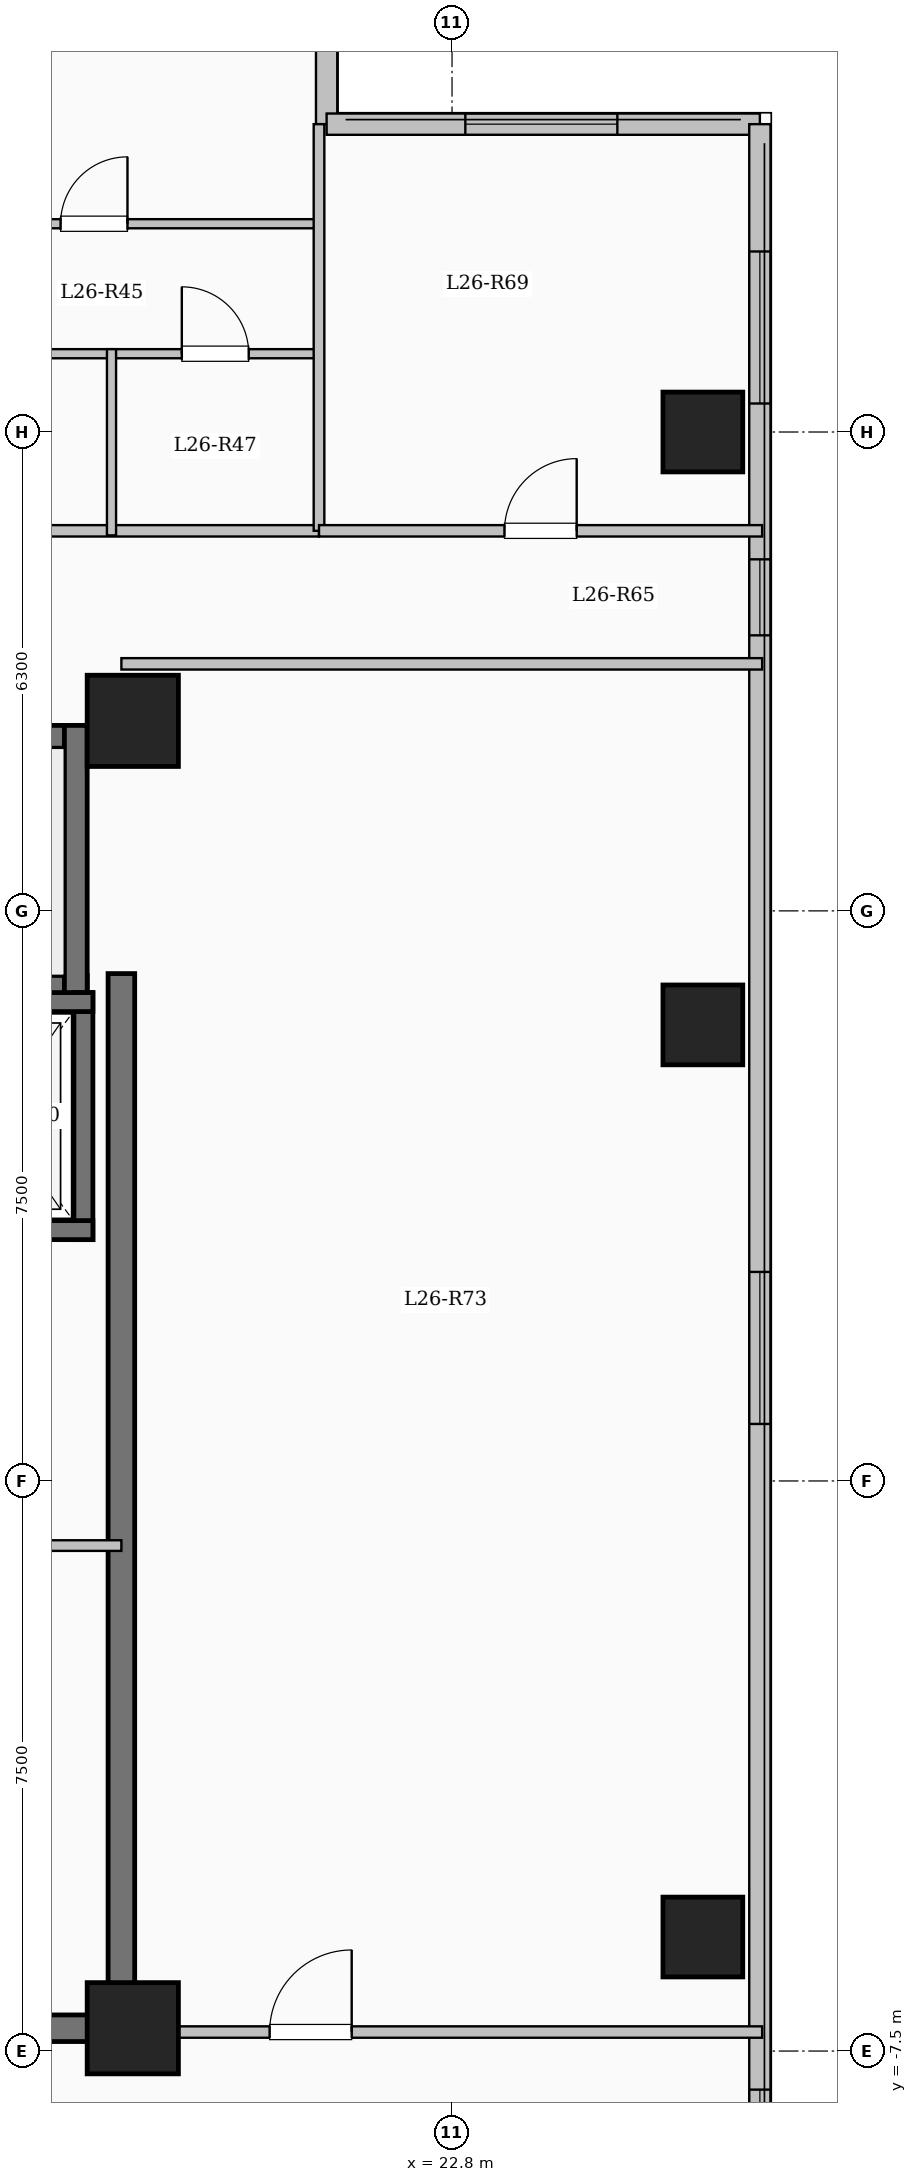
"""IFC4 building model, lengths in metres.
Left out: names, types, materials, properties, quantities, classifications, styles, units other than length and angle.
Written with IfcOpenShell. Run it as: python <this file> out.ifc"""

import sys

from ifc_helpers import new_model, si_unit, direction, frame, frame_2d, origin, origin_2d, place, context, subcontext, project, spatial, rectangle, extrude, element, fill, save


model = new_model("IFC4")
c1 = context("Model", 3, precision=1e-05, world=origin(), true_north=direction((0.0, 1.0)))
c2 = subcontext(c1, "Body", "Model", "MODEL_VIEW")
j1 = project(units=[si_unit("LENGTHUNIT", "METRE"), si_unit("PLANEANGLEUNIT", "RADIAN")], contexts=[c1])
p1 = place(None, origin())
s1 = spatial("IfcSite", under=j1, at=p1, CompositionType="ELEMENT")
p2 = place(p1, origin())
s2 = spatial("IfcBuilding", under=s1, at=p2, CompositionType="ELEMENT")
p3 = place(p2, frame((0.0, 0.0, 98.4)))
s3 = spatial("IfcBuildingStorey", under=s2, at=p3, CompositionType="ELEMENT", Elevation=98.4)
for number, where, z_axis, x_axis in (
    (1, (18.6, -7.2, 0.0), (0.0, 0.0, 1.0), (1.0, 0.0, 0.0)),
    (2, (18.6, 10.0, 0.0), (0.0, 0.0, 1.0), (1.0, 0.0, 0.0)),
):
    element("IfcColumn", number, at=place(p3, frame(where, z_axis=z_axis, x_axis=x_axis)), inside=s3, PredefinedType="COLUMN", context=c2, shape_type="SweptSolid", body=[
        extrude(rectangle(XDim=1.2, YDim=1.2, at=origin_2d()), origin(), (0.0, 0.0, 1.0), 3.35),
    ])
for number, where, z_axis, x_axis in (
    (3, (26.1, -6.0, 0.0), (0.0, 0.0, 1.0), (1.0, 0.0, 0.0)),
    (4, (26.1, 6.0, 0.0), (0.0, 0.0, 1.0), (1.0, 0.0, 0.0)),
    (5, (26.1, 13.8, 0.0), (0.0, 0.0, 1.0), (1.0, 0.0, 0.0)),
):
    element("IfcColumn", number, at=place(p3, frame(where, z_axis=z_axis, x_axis=x_axis)), inside=s3, PredefinedType="COLUMN", context=c2, shape_type="SweptSolid", body=[
        extrude(rectangle(XDim=1.05, YDim=1.05, at=origin_2d()), origin(), (0.0, 0.0, 1.0), 3.35),
    ])
p4 = place(p3, frame((21.15, 22.05, 0.0), z_axis=(0.0, 0.0, 1.0), x_axis=(0.0, -1.0, 0.0)))
e6 = element("IfcWall", 6, at=p4, inside=s3, PredefinedType="SOLIDWALL", context=c2, shape_type="SweptSolid", body=[
    extrude(rectangle(XDim=4.2, YDim=0.28, at=frame_2d((2.1, 0.0))), origin(), (0.0, 0.0, 1.0), 3.1),
])
p5 = place(p4, frame((1.218, 0.0, 0.9)))
e7 = element("IfcOpeningElement", 7, at=p5, cuts=e6, PredefinedType="OPENING", context=c2, shape_type="SweptSolid", body=[
    extrude(rectangle(XDim=1.8, YDim=1.65, at=frame_2d((0.9, 0.825))), frame((0.0, 0.15, 0.0), z_axis=(0.0, -1.0, 0.0), x_axis=(1.0, 0.0, 0.0)), (0.0, 0.0, 1.0), 0.3),
])
p6 = place(p3, frame((21.15, 17.85, 0.0), z_axis=(0.0, 0.0, 1.0), x_axis=(1.0, 0.0, 0.0)))
e8 = element("IfcWall", 8, at=p6, inside=s3, PredefinedType="SOLIDWALL", context=c2, shape_type="SweptSolid", body=[
    extrude(rectangle(XDim=5.7, YDim=0.28, at=frame_2d((2.85, 0.0))), origin(), (0.0, 0.0, 1.0), 3.1),
])
p7 = place(p6, frame((1.825, 0.0, 0.9)))
e9 = element("IfcOpeningElement", 9, at=p7, cuts=e8, PredefinedType="OPENING", context=c2, shape_type="SweptSolid", body=[
    extrude(rectangle(XDim=2.0, YDim=1.7, at=frame_2d((1.0, 0.85))), frame((0.0, 0.15, 0.0), z_axis=(0.0, -1.0, 0.0), x_axis=(1.0, 0.0, 0.0)), (0.0, 0.0, 1.0), 0.3),
])
p8 = place(p3, frame((26.85, 17.85, 0.0), z_axis=(0.0, 0.0, 1.0), x_axis=(0.0, -1.0, 0.0)))
e10 = element("IfcWall", 10, at=p8, inside=s3, PredefinedType="SOLIDWALL", context=c2, shape_type="SweptSolid", body=[
    extrude(rectangle(XDim=35.7, YDim=0.28, at=frame_2d((17.85, 0.0))), origin(), (0.0, 0.0, 1.0), 3.1),
])
p9 = place(p8, frame((1.675, 0.0, 0.9)))
e11 = element("IfcOpeningElement", 11, at=p9, cuts=e10, PredefinedType="OPENING", context=c2, shape_type="SweptSolid", body=[
    extrude(rectangle(XDim=2.0, YDim=1.7, at=frame_2d((1.0, 0.85))), frame((0.0, 0.15, 0.0), z_axis=(0.0, -1.0, 0.0), x_axis=(1.0, 0.0, 0.0)), (0.0, 0.0, 1.0), 0.3),
])
p10 = place(p8, frame((5.725, 0.0, 0.95)))
e12 = element("IfcOpeningElement", 12, at=p10, cuts=e10, PredefinedType="OPENING", context=c2, shape_type="SweptSolid", body=[
    extrude(rectangle(XDim=1.0, YDim=1.5, at=frame_2d((0.5, 0.75))), frame((0.0, 0.15, 0.0), z_axis=(0.0, -1.0, 0.0), x_axis=(1.0, 0.0, 0.0)), (0.0, 0.0, 1.0), 0.3),
])
p11 = place(p8, frame((15.1, 0.0, 0.9)))
e13 = element("IfcOpeningElement", 13, at=p11, cuts=e10, PredefinedType="OPENING", context=c2, shape_type="SweptSolid", body=[
    extrude(rectangle(XDim=2.0, YDim=1.7, at=frame_2d((1.0, 0.85))), frame((0.0, 0.15, 0.0), z_axis=(0.0, -1.0, 0.0), x_axis=(1.0, 0.0, 0.0)), (0.0, 0.0, 1.0), 0.3),
])
p12 = place(p8, frame((25.857, 0.0, 0.9)))
e14 = element("IfcOpeningElement", 14, at=p12, cuts=e10, PredefinedType="OPENING", context=c2, shape_type="SweptSolid", body=[
    extrude(rectangle(XDim=1.5, YDim=1.65, at=frame_2d((0.75, 0.825))), frame((0.0, 0.15, 0.0), z_axis=(0.0, -1.0, 0.0), x_axis=(1.0, 0.0, 0.0)), (0.0, 0.0, 1.0), 0.3),
])
p13 = place(p8, frame((30.75, 0.0, 0.9)))
e15 = element("IfcOpeningElement", 15, at=p13, cuts=e10, PredefinedType="OPENING", context=c2, shape_type="SweptSolid", body=[
    extrude(rectangle(XDim=2.4, YDim=1.8, at=frame_2d((1.2, 0.9))), frame((0.0, 0.15, 0.0), z_axis=(0.0, -1.0, 0.0), x_axis=(1.0, 0.0, 0.0)), (0.0, 0.0, 1.0), 0.3),
])
p14 = place(p3, frame((10.0, 9.79, 0.0), z_axis=(0.0, 0.0, 1.0), x_axis=(1.0, 0.0, 0.0)))
e16 = element("IfcWall", 16, at=p14, inside=s3, PredefinedType="SHEAR", context=c2, shape_type="SweptSolid", body=[
    extrude(rectangle(XDim=8.0, YDim=0.3, at=frame_2d((4.0, 0.0))), origin(), (0.0, 0.0, 1.0), 3.35),
])
p15 = place(p3, frame((10.0, 6.5, 0.0), z_axis=(0.0, 0.0, 1.0), x_axis=(1.0, 0.0, 0.0)))
e17 = element("IfcWall", 17, at=p15, inside=s3, PredefinedType="SHEAR", context=c2, shape_type="SweptSolid", body=[
    extrude(rectangle(XDim=8.0, YDim=0.3, at=frame_2d((4.0, 0.0))), origin(), (0.0, 0.0, 1.0), 3.35),
])
p16 = place(p15, frame((0.55, 0.0, 0.0)))
e18 = element("IfcOpeningElement", 18, at=p16, cuts=e17, PredefinedType="OPENING", context=c2, shape_type="SweptSolid", body=[
    extrude(rectangle(XDim=1.0, YDim=2.15, at=frame_2d((0.5, 1.075))), frame((0.0, 0.16, 0.0), z_axis=(0.0, -1.0, 0.0), x_axis=(1.0, 0.0, 0.0)), (0.0, 0.0, 1.0), 0.32),
])
p17 = place(p3, frame((17.85, 6.35, 0.0), z_axis=(0.0, 0.0, 1.0), x_axis=(0.0, 1.0, 0.0)))
e19 = element("IfcWall", 19, at=p17, inside=s3, PredefinedType="SHEAR", context=c2, shape_type="SweptSolid", body=[
    extrude(rectangle(XDim=3.59, YDim=0.3, at=frame_2d((1.795, 0.0))), origin(), (0.0, 0.0, 1.0), 3.35),
])
p18 = place(p3, frame((17.95, 3.175, 0.0), z_axis=(0.0, 0.0, 1.0), x_axis=(0.0, 1.0, 0.0)))
e20 = element("IfcWall", 20, at=p18, inside=s3, PredefinedType="SHEAR", context=c2, shape_type="SweptSolid", body=[
    extrude(rectangle(XDim=3.25, YDim=0.25, at=frame_2d((1.625, 0.0))), origin(), (0.0, 0.0, 1.0), 3.35),
])
for number, where, z_axis, x_axis in (
    (21, (15.525, 3.3, 0.0), (0.0, 0.0, 1.0), (1.0, 0.0, 0.0)),
    (22, (15.525, 6.3, 0.0), (0.0, 0.0, 1.0), (1.0, 0.0, 0.0)),
):
    element("IfcWall", number, at=place(p3, frame(where, z_axis=z_axis, x_axis=x_axis)), inside=s3, PredefinedType="SHEAR", context=c2, shape_type="SweptSolid", body=[
        extrude(rectangle(XDim=2.55, YDim=0.25, at=frame_2d((1.275, 0.0))), origin(), (0.0, 0.0, 1.0), 3.35),
    ])
p19 = place(p3, frame((18.45, -7.375, 0.0), z_axis=(0.0, 0.0, 1.0), x_axis=(0.0, 1.0, 0.0)))
e23 = element("IfcWall", 23, at=p19, inside=s3, PredefinedType="SHEAR", context=c2, shape_type="SweptSolid", body=[
    extrude(rectangle(XDim=14.05, YDim=0.35, at=frame_2d((7.025, 0.0))), origin(), (0.0, 0.0, 1.0), 3.35),
])
p20 = place(p3, frame((10.075, -7.2, 0.0), z_axis=(0.0, 0.0, 1.0), x_axis=(1.0, 0.0, 0.0)))
e24 = element("IfcWall", 24, at=p20, inside=s3, PredefinedType="SHEAR", context=c2, shape_type="SweptSolid", body=[
    extrude(rectangle(XDim=8.55, YDim=0.35, at=frame_2d((4.275, 0.0))), origin(), (0.0, 0.0, 1.0), 3.35),
])
p21 = place(p3, frame((15.4, -0.85, 0.0), z_axis=(0.0, 0.0, 1.0), x_axis=(1.0, 0.0, 0.0)))
e25 = element("IfcWall", 25, at=p21, inside=s3, PredefinedType="PARTITIONING", context=c2, shape_type="SweptSolid", body=[
    extrude(rectangle(XDim=3.05, YDim=0.14, at=frame_2d((1.525, 0.0))), origin(), (0.0, 0.0, 1.0), 3.1),
])
p22 = place(p21, frame((1.05, 0.0, 0.0)))
e26 = element("IfcOpeningElement", 26, at=p22, cuts=e25, PredefinedType="OPENING", context=c2, shape_type="SweptSolid", body=[
    extrude(rectangle(XDim=0.9, YDim=2.08, at=frame_2d((0.45, 1.04))), frame((0.0, 0.08, 0.0), z_axis=(0.0, -1.0, 0.0), x_axis=(1.0, 0.0, 0.0)), (0.0, 0.0, 1.0), 0.16),
])
p23 = place(p3, frame((3.85, 12.5, 0.0), z_axis=(0.0, 0.0, 1.0), x_axis=(1.0, 0.0, 0.0)))
e27 = element("IfcWall", 27, at=p23, inside=s3, PredefinedType="PARTITIONING", context=c2, shape_type="SweptSolid", body=[
    extrude(rectangle(XDim=17.2, YDim=0.15, at=frame_2d((8.6, 0.0))), origin(), (0.0, 0.0, 1.0), 3.1),
])
p24 = place(p23, frame((1.6, 0.0, 0.0)))
e28 = element("IfcOpeningElement", 28, at=p24, cuts=e27, PredefinedType="OPENING", context=c2, shape_type="SweptSolid", body=[
    extrude(rectangle(XDim=0.96, YDim=2.15, at=frame_2d((0.48, 1.075))), frame((0.0, 0.085, 0.0), z_axis=(0.0, -1.0, 0.0), x_axis=(1.0, 0.0, 0.0)), (0.0, 0.0, 1.0), 0.17),
])
p25 = place(p23, frame((6.42, 0.0, 0.0)))
e29 = element("IfcOpeningElement", 29, at=p25, cuts=e27, PredefinedType="OPENING", context=c2, shape_type="SweptSolid", body=[
    extrude(rectangle(XDim=0.96, YDim=2.15, at=frame_2d((0.48, 1.075))), frame((0.0, 0.085, 0.0), z_axis=(0.0, -1.0, 0.0), x_axis=(1.0, 0.0, 0.0)), (0.0, 0.0, 1.0), 0.17),
])
p26 = place(p3, frame((15.31, 14.83, 0.0), z_axis=(0.0, 0.0, 1.0), x_axis=(1.0, 0.0, 0.0)))
e30 = element("IfcWall", 30, at=p26, inside=s3, PredefinedType="PARTITIONING", context=c2, shape_type="SweptSolid", body=[
    extrude(rectangle(XDim=3.01, YDim=0.12, at=frame_2d((1.505, 0.0))), origin(), (0.0, 0.0, 1.0), 3.1),
])
p27 = place(p26, frame((1.065, 0.0, 0.0)))
e31 = element("IfcOpeningElement", 31, at=p27, cuts=e30, PredefinedType="OPENING", context=c2, shape_type="SweptSolid", body=[
    extrude(rectangle(XDim=0.88, YDim=2.1, at=frame_2d((0.44, 1.05))), frame((0.0, 0.07, 0.0), z_axis=(0.0, -1.0, 0.0), x_axis=(1.0, 0.0, 0.0)), (0.0, 0.0, 1.0), 0.14),
])
p28 = place(p3, frame((18.32, 14.83, 0.0), z_axis=(0.0, 0.0, 1.0), x_axis=(1.0, 0.0, 0.0)))
e32 = element("IfcWall", 32, at=p28, inside=s3, PredefinedType="PARTITIONING", context=c2, shape_type="SweptSolid", body=[
    extrude(rectangle(XDim=2.73, YDim=0.12, at=frame_2d((1.365, 0.0))), origin(), (0.0, 0.0, 1.0), 3.1),
])
p29 = place(p28, frame((0.925, 0.0, 0.0)))
e33 = element("IfcOpeningElement", 33, at=p29, cuts=e32, PredefinedType="OPENING", context=c2, shape_type="SweptSolid", body=[
    extrude(rectangle(XDim=0.88, YDim=2.1, at=frame_2d((0.44, 1.05))), frame((0.0, 0.07, 0.0), z_axis=(0.0, -1.0, 0.0), x_axis=(1.0, 0.0, 0.0)), (0.0, 0.0, 1.0), 0.14),
])
p30 = place(p3, frame((15.25, 16.54, 0.0), z_axis=(0.0, 0.0, 1.0), x_axis=(1.0, 0.0, 0.0)))
e34 = element("IfcWall", 34, at=p30, inside=s3, PredefinedType="PARTITIONING", context=c2, shape_type="SweptSolid", body=[
    extrude(rectangle(XDim=5.86, YDim=0.12, at=frame_2d((2.93, 0.0))), origin(), (0.0, 0.0, 1.0), 3.1),
])
p31 = place(p30, frame((2.4, 0.0, 0.0)))
e35 = element("IfcOpeningElement", 35, at=p31, cuts=e34, PredefinedType="OPENING", context=c2, shape_type="SweptSolid", body=[
    extrude(rectangle(XDim=0.88, YDim=2.1, at=frame_2d((0.44, 1.05))), frame((0.0, 0.07, 0.0), z_axis=(0.0, -1.0, 0.0), x_axis=(1.0, 0.0, 0.0)), (0.0, 0.0, 1.0), 0.14),
])
p32 = place(p3, frame((18.32, 12.44, 0.0), z_axis=(0.0, 0.0, 1.0), x_axis=(0.0, 1.0, 0.0)))
e36 = element("IfcWall", 36, at=p32, inside=s3, PredefinedType="PARTITIONING", context=c2, shape_type="SweptSolid", body=[
    extrude(rectangle(XDim=2.45, YDim=0.12, at=frame_2d((1.225, 0.0))), origin(), (0.0, 0.0, 1.0), 3.1),
])
p33 = place(p3, frame((18.45, -7.25, 0.0), z_axis=(0.0, 0.0, 1.0), x_axis=(1.0, 0.0, 0.0)))
e37 = element("IfcWall", 37, at=p33, inside=s3, PredefinedType="PARTITIONING", context=c2, shape_type="SweptSolid", body=[
    extrude(rectangle(XDim=8.43, YDim=0.15, at=frame_2d((4.215, 0.0))), origin(), (0.0, 0.0, 1.0), 3.1),
])
p34 = place(p33, frame((1.95, 0.0, 0.0)))
e38 = element("IfcOpeningElement", 38, at=p34, cuts=e37, PredefinedType="OPENING", context=c2, shape_type="SweptSolid", body=[
    extrude(rectangle(XDim=1.08, YDim=2.15, at=frame_2d((0.54, 1.075))), frame((0.0, 0.085, 0.0), z_axis=(0.0, -1.0, 0.0), x_axis=(1.0, 0.0, 0.0)), (0.0, 0.0, 1.0), 0.17),
])
p35 = place(p3, frame((18.45, 10.75, 0.0), z_axis=(0.0, 0.0, 1.0), x_axis=(1.0, 0.0, 0.0)))
e39 = element("IfcWall", 39, at=p35, inside=s3, PredefinedType="PARTITIONING", context=c2, shape_type="SweptSolid", body=[
    extrude(rectangle(XDim=8.43, YDim=0.15, at=frame_2d((4.215, 0.0))), origin(), (0.0, 0.0, 1.0), 3.1),
])
p36 = place(p3, frame((21.05, 12.5, 0.0), z_axis=(0.0, 0.0, 1.0), x_axis=(0.0, 1.0, 0.0)))
e40 = element("IfcWall", 40, at=p36, inside=s3, PredefinedType="PARTITIONING", context=c2, shape_type="SweptSolid", body=[
    extrude(rectangle(XDim=5.35, YDim=0.14, at=frame_2d((2.675, 0.0))), origin(), (0.0, 0.0, 1.0), 3.1),
])
p37 = place(p3, frame((21.05, 12.5, 0.0), z_axis=(0.0, 0.0, 1.0), x_axis=(1.0, 0.0, 0.0)))
e41 = element("IfcWall", 41, at=p37, inside=s3, PredefinedType="PARTITIONING", context=c2, shape_type="SweptSolid", body=[
    extrude(rectangle(XDim=5.83, YDim=0.15, at=frame_2d((2.915, 0.0))), origin(), (0.0, 0.0, 1.0), 3.1),
])
p38 = place(p37, frame((2.44, 0.0, 0.0)))
e42 = element("IfcOpeningElement", 42, at=p38, cuts=e41, PredefinedType="OPENING", context=c2, shape_type="SweptSolid", body=[
    extrude(rectangle(XDim=0.95, YDim=2.15, at=frame_2d((0.475, 1.075))), frame((0.0, 0.085, 0.0), z_axis=(0.0, -1.0, 0.0), x_axis=(1.0, 0.0, 0.0)), (0.0, 0.0, 1.0), 0.17),
])
p39 = place(p7, origin())
e43 = element("IfcWindow", 43, at=p39, inside=s3, PartitioningType="SINGLE_PANEL", PredefinedType="WINDOW", context=c2, shape_type="SweptSolid", body=[
    extrude(rectangle(XDim=2.0, YDim=1.7, at=frame_2d((1.0, 0.85))), frame((0.0, 0.03, 0.0), z_axis=(0.0, -1.0, 0.0), x_axis=(1.0, 0.0, 0.0)), (0.0, 0.0, 1.0), 0.06),
])
fill(e9, e43)
p40 = place(p9, origin())
e44 = element("IfcWindow", 44, at=p40, inside=s3, PartitioningType="SINGLE_PANEL", PredefinedType="WINDOW", context=c2, shape_type="SweptSolid", body=[
    extrude(rectangle(XDim=2.0, YDim=1.7, at=frame_2d((1.0, 0.85))), frame((0.0, 0.03, 0.0), z_axis=(0.0, -1.0, 0.0), x_axis=(1.0, 0.0, 0.0)), (0.0, 0.0, 1.0), 0.06),
])
fill(e11, e44)
p41 = place(p10, origin())
e45 = element("IfcWindow", 45, at=p41, inside=s3, PartitioningType="SINGLE_PANEL", PredefinedType="WINDOW", context=c2, shape_type="SweptSolid", body=[
    extrude(rectangle(XDim=1.0, YDim=1.5, at=frame_2d((0.5, 0.75))), frame((0.0, 0.03, 0.0), z_axis=(0.0, -1.0, 0.0), x_axis=(1.0, 0.0, 0.0)), (0.0, 0.0, 1.0), 0.06),
])
fill(e12, e45)
p42 = place(p11, origin())
e46 = element("IfcWindow", 46, at=p42, inside=s3, PartitioningType="SINGLE_PANEL", PredefinedType="WINDOW", context=c2, shape_type="SweptSolid", body=[
    extrude(rectangle(XDim=2.0, YDim=1.7, at=frame_2d((1.0, 0.85))), frame((0.0, 0.03, 0.0), z_axis=(0.0, -1.0, 0.0), x_axis=(1.0, 0.0, 0.0)), (0.0, 0.0, 1.0), 0.06),
])
fill(e13, e46)
p43 = place(p12, origin())
e47 = element("IfcWindow", 47, at=p43, inside=s3, PartitioningType="SINGLE_PANEL", PredefinedType="WINDOW", context=c2, shape_type="SweptSolid", body=[
    extrude(rectangle(XDim=1.5, YDim=1.65, at=frame_2d((0.75, 0.825))), frame((0.0, 0.03, 0.0), z_axis=(0.0, -1.0, 0.0), x_axis=(1.0, 0.0, 0.0)), (0.0, 0.0, 1.0), 0.06),
])
fill(e14, e47)
p44 = place(p29, origin())
e48 = element("IfcDoor", 48, at=p44, inside=s3, OperationType="SINGLE_SWING_LEFT", PredefinedType="DOOR", context=c2, shape_type="SweptSolid", body=[
    extrude(rectangle(XDim=0.88, YDim=2.1, at=frame_2d((0.44, 1.05))), frame((0.0, 0.025, 0.0), z_axis=(0.0, -1.0, 0.0), x_axis=(1.0, 0.0, 0.0)), (0.0, 0.0, 1.0), 0.05),
])
fill(e33, e48)
p45 = place(p31, origin())
e49 = element("IfcDoor", 49, at=p45, inside=s3, OperationType="SINGLE_SWING_RIGHT", PredefinedType="DOOR", context=c2, shape_type="SweptSolid", body=[
    extrude(rectangle(XDim=0.88, YDim=2.1, at=frame_2d((0.44, 1.05))), frame((0.0, 0.025, 0.0), z_axis=(0.0, -1.0, 0.0), x_axis=(1.0, 0.0, 0.0)), (0.0, 0.0, 1.0), 0.05),
])
fill(e35, e49)
p46 = place(p38, origin())
e50 = element("IfcDoor", 50, at=p46, inside=s3, OperationType="SINGLE_SWING_RIGHT", PredefinedType="DOOR", context=c2, shape_type="SweptSolid", body=[
    extrude(rectangle(XDim=0.95, YDim=2.15, at=frame_2d((0.475, 1.075))), frame((0.0, 0.025, 0.0), z_axis=(0.0, -1.0, 0.0), x_axis=(1.0, 0.0, 0.0)), (0.0, 0.0, 1.0), 0.05),
])
fill(e42, e50)
p47 = place(p34, origin())
e51 = element("IfcDoor", 51, at=p47, inside=s3, OperationType="SINGLE_SWING_RIGHT", PredefinedType="DOOR", context=c2, shape_type="SweptSolid", body=[
    extrude(rectangle(XDim=1.08, YDim=2.15, at=frame_2d((0.54, 1.075))), frame((0.0, 0.025, 0.0), z_axis=(0.0, -1.0, 0.0), x_axis=(1.0, 0.0, 0.0)), (0.0, 0.0, 1.0), 0.05),
])
fill(e38, e51)
save(model, sys.argv[1])
